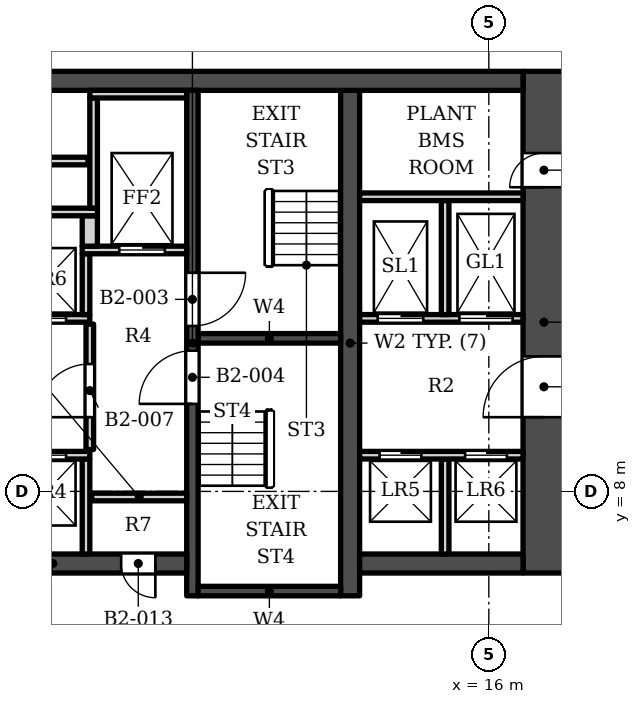
"""IFC4 building model, lengths in metres.
Left out: names, types, materials, properties, quantities, classifications, styles, units other than length and angle.
Written with IfcOpenShell. Run it as: python <this file> out.ifc"""

import sys

from ifc_helpers import new_model, si_unit, direction, frame, frame_2d, origin, place, context, subcontext, project, spatial, rectangle, extrude, element, fill, save


model = new_model("IFC4")
c1 = context("Model", 3, precision=1e-05, world=origin(), true_north=direction((0.0, 1.0)))
c2 = subcontext(c1, "Body", "Model", "MODEL_VIEW")
j1 = project(units=[si_unit("LENGTHUNIT", "METRE"), si_unit("PLANEANGLEUNIT", "RADIAN")], contexts=[c1])
p1 = place(None, origin())
s1 = spatial("IfcSite", under=j1, at=p1, CompositionType="ELEMENT")
p2 = place(p1, origin())
s2 = spatial("IfcBuilding", under=s1, at=p2, CompositionType="ELEMENT")
p3 = place(p2, frame((0.0, 0.0, -10.0)))
s3 = spatial("IfcBuildingStorey", under=s2, at=p3, CompositionType="ELEMENT", Elevation=-10.0)
p4 = place(p3, frame((-16.9, 18.802, -1.6), z_axis=(0.0, 0.0, 1.0), x_axis=(1.0, 0.0, 0.0)))
e1 = element("IfcWall", 1, at=p4, inside=s3, PredefinedType="SHEAR", context=c2, shape_type="SweptSolid", body=[
    extrude(rectangle(XDim=33.8, YDim=0.5, at=frame_2d((16.9, 0.0))), origin(), (0.0, 0.0, 1.0), 6.6),
])
p5 = place(p3, frame((12.35, 5.253, -1.6), z_axis=(0.0, 0.0, 1.0), x_axis=(0.0, 1.0, 0.0)))
e2 = element("IfcWall", 2, at=p5, inside=s3, PredefinedType="SHEAR", context=c2, shape_type="SweptSolid", body=[
    extrude(rectangle(XDim=13.3, YDim=0.5, at=frame_2d((6.65, 0.0))), origin(), (0.0, 0.0, 1.0), 6.6),
])
p6 = place(p3, frame((8.2, 5.253, -1.6), z_axis=(0.0, 0.0, 1.0), x_axis=(0.0, 1.0, 0.0)))
e3 = element("IfcWall", 3, at=p6, inside=s3, PredefinedType="SHEAR", context=c2, shape_type="SweptSolid", body=[
    extrude(rectangle(XDim=13.3, YDim=0.3, at=frame_2d((6.65, 0.0))), origin(), (0.0, 0.0, 1.0), 6.6),
])
p7 = place(p6, frame((7.1, 0.0, 1.6)))
e4 = element("IfcOpeningElement", 4, at=p7, cuts=e3, PredefinedType="OPENING", context=c2, shape_type="SweptSolid", body=[
    extrude(rectangle(XDim=1.4, YDim=2.1, at=frame_2d((0.7, 1.05))), frame((0.0, 0.16, 0.0), z_axis=(0.0, -1.0, 0.0), x_axis=(1.0, 0.0, 0.0)), (0.0, 0.0, 1.0), 0.32),
])
p8 = place(p6, frame((5.05, 0.0, 1.6)))
e5 = element("IfcOpeningElement", 5, at=p8, cuts=e3, PredefinedType="OPENING", context=c2, shape_type="SweptSolid", body=[
    extrude(rectangle(XDim=1.4, YDim=2.1, at=frame_2d((0.7, 1.05))), frame((0.0, 0.16, 0.0), z_axis=(0.0, -1.0, 0.0), x_axis=(1.0, 0.0, 0.0)), (0.0, 0.0, 1.0), 0.32),
])
for number, where, z_axis, x_axis in (
    (6, (8.35, 12.028, -1.6), (0.0, 0.0, 1.0), (1.0, 0.0, 0.0)),
    (7, (8.35, 5.378, -1.6), (0.0, 0.0, 1.0), (1.0, 0.0, 0.0)),
):
    element("IfcWall", number, at=place(p3, frame(where, z_axis=z_axis, x_axis=x_axis)), inside=s3, PredefinedType="SHEAR", context=c2, shape_type="SweptSolid", body=[
        extrude(rectangle(XDim=3.75, YDim=0.25, at=frame_2d((1.875, 0.0))), origin(), (0.0, 0.0, 1.0), 6.6),
    ])
p9 = place(p3, frame((1.0, 6.103, -1.6), z_axis=(0.0, 0.0, 1.0), x_axis=(1.0, 0.0, 0.0)))
e8 = element("IfcWall", 8, at=p9, inside=s3, PredefinedType="SHEAR", context=c2, shape_type="SweptSolid", body=[
    extrude(rectangle(XDim=7.05, YDim=0.5, at=frame_2d((3.525, 0.0))), origin(), (0.0, 0.0, 1.0), 6.6),
])
p10 = place(p9, frame((5.325, 0.0, 1.6)))
e9 = element("IfcOpeningElement", 9, at=p10, cuts=e8, PredefinedType="OPENING", context=c2, shape_type="SweptSolid", body=[
    extrude(rectangle(XDim=0.9, YDim=2.1, at=frame_2d((0.45, 1.05))), frame((0.0, 0.26, 0.0), z_axis=(0.0, -1.0, 0.0), x_axis=(1.0, 0.0, 0.0)), (0.0, 0.0, 1.0), 0.52),
])
p11 = place(p3, frame((12.6, 6.103, -1.6), z_axis=(0.0, 0.0, 1.0), x_axis=(1.0, 0.0, 0.0)))
e10 = element("IfcWall", 10, at=p11, inside=s3, PredefinedType="SHEAR", context=c2, shape_type="SweptSolid", body=[
    extrude(rectangle(XDim=4.3, YDim=0.5, at=frame_2d((2.15, 0.0))), origin(), (0.0, 0.0, 1.0), 6.6),
])
p12 = place(p3, frame((17.45, 5.853, -1.6), z_axis=(0.0, 0.0, 1.0), x_axis=(0.0, 1.0, 0.0)))
e11 = element("IfcWall", 11, at=p12, inside=s3, PredefinedType="SHEAR", context=c2, shape_type="SweptSolid", body=[
    extrude(rectangle(XDim=13.2, YDim=1.1, at=frame_2d((6.6, 0.0))), origin(), (0.0, 0.0, 1.0), 6.6),
])
p13 = place(p12, frame((4.1, 0.0, 1.6)))
e12 = element("IfcOpeningElement", 12, at=p13, cuts=e11, PredefinedType="OPENING", context=c2, shape_type="SweptSolid", body=[
    extrude(rectangle(XDim=1.6, YDim=2.1, at=frame_2d((0.8, 1.05))), frame((0.0, 0.56, 0.0), z_axis=(0.0, -1.0, 0.0), x_axis=(1.0, 0.0, 0.0)), (0.0, 0.0, 1.0), 1.12),
])
p14 = place(p12, frame((10.15, 0.0, 1.6)))
e13 = element("IfcOpeningElement", 13, at=p14, cuts=e11, PredefinedType="OPENING", context=c2, shape_type="SweptSolid", body=[
    extrude(rectangle(XDim=0.9, YDim=2.1, at=frame_2d((0.45, 1.05))), frame((0.0, 0.56, 0.0), z_axis=(0.0, -1.0, 0.0), x_axis=(1.0, 0.0, 0.0)), (0.0, 0.0, 1.0), 1.12),
])
for number, where, z_axis, x_axis in (
    (14, (5.4, 6.353, 0.0), (0.0, 0.0, 1.0), (0.0, 1.0, 0.0)),
    (15, (14.85, 6.353, 0.0), (0.0, 0.0, 1.0), (0.0, 1.0, 0.0)),
    (16, (5.55, 7.853, 0.0), (0.0, 0.0, 1.0), (1.0, 0.0, 0.0)),
):
    element("IfcWall", number, at=place(p3, frame(where, z_axis=z_axis, x_axis=x_axis)), inside=s3, PredefinedType="SOLIDWALL", context=c2, shape_type="SweptSolid", body=[
        extrude(rectangle(XDim=2.5, YDim=0.2, at=frame_2d((1.25, 0.0))), origin(), (0.0, 0.0, 1.0), 4.5),
    ])
p15 = place(p3, frame((1.0, 8.953, 0.0), z_axis=(0.0, 0.0, 1.0), x_axis=(1.0, 0.0, 0.0)))
e17 = element("IfcWall", 17, at=p15, inside=s3, PredefinedType="SOLIDWALL", context=c2, shape_type="SweptSolid", body=[
    extrude(rectangle(XDim=4.5, YDim=0.2, at=frame_2d((2.25, 0.0))), origin(), (0.0, 0.0, 1.0), 4.5),
])
p16 = place(p15, frame((0.625, 0.0, 0.0)))
e18 = element("IfcOpeningElement", 18, at=p16, cuts=e17, PredefinedType="OPENING", context=c2, shape_type="SweptSolid", body=[
    extrude(rectangle(XDim=1.1, YDim=2.1, at=frame_2d((0.55, 1.05))), frame((0.0, 0.11, 0.0), z_axis=(0.0, -1.0, 0.0), x_axis=(1.0, 0.0, 0.0)), (0.0, 0.0, 1.0), 0.22),
])
p17 = place(p15, frame((2.775, 0.0, 0.0)))
e19 = element("IfcOpeningElement", 19, at=p17, cuts=e17, PredefinedType="OPENING", context=c2, shape_type="SweptSolid", body=[
    extrude(rectangle(XDim=1.1, YDim=2.1, at=frame_2d((0.55, 1.05))), frame((0.0, 0.11, 0.0), z_axis=(0.0, -1.0, 0.0), x_axis=(1.0, 0.0, 0.0)), (0.0, 0.0, 1.0), 0.22),
])
p18 = place(p3, frame((12.6, 8.953, 0.0), z_axis=(0.0, 0.0, 1.0), x_axis=(1.0, 0.0, 0.0)))
e20 = element("IfcWall", 20, at=p18, inside=s3, PredefinedType="SOLIDWALL", context=c2, shape_type="SweptSolid", body=[
    extrude(rectangle(XDim=4.3, YDim=0.2, at=frame_2d((2.15, 0.0))), origin(), (0.0, 0.0, 1.0), 4.5),
])
p19 = place(p18, frame((0.525, 0.0, 0.0)))
e21 = element("IfcOpeningElement", 21, at=p19, cuts=e20, PredefinedType="OPENING", context=c2, shape_type="SweptSolid", body=[
    extrude(rectangle(XDim=1.1, YDim=2.1, at=frame_2d((0.55, 1.05))), frame((0.0, 0.11, 0.0), z_axis=(0.0, -1.0, 0.0), x_axis=(1.0, 0.0, 0.0)), (0.0, 0.0, 1.0), 0.22),
])
p20 = place(p18, frame((2.775, 0.0, 0.0)))
e22 = element("IfcOpeningElement", 22, at=p20, cuts=e20, PredefinedType="OPENING", context=c2, shape_type="SweptSolid", body=[
    extrude(rectangle(XDim=1.1, YDim=2.1, at=frame_2d((0.55, 1.05))), frame((0.0, 0.11, 0.0), z_axis=(0.0, -1.0, 0.0), x_axis=(1.0, 0.0, 0.0)), (0.0, 0.0, 1.0), 0.22),
])
p21 = place(p3, frame((5.5, 9.103, 0.0), z_axis=(0.0, 0.0, 1.0), x_axis=(0.0, 1.0, 0.0)))
e23 = element("IfcWall", 23, at=p21, inside=s3, PredefinedType="SOLIDWALL", context=c2, shape_type="SweptSolid", body=[
    extrude(rectangle(XDim=3.3, YDim=0.2, at=frame_2d((1.65, 0.0))), origin(), (0.0, 0.0, 1.0), 4.5),
])
p22 = place(p21, frame((0.85, 0.0, 0.0)))
e24 = element("IfcOpeningElement", 24, at=p22, cuts=e23, PredefinedType="OPENING", context=c2, shape_type="SweptSolid", body=[
    extrude(rectangle(XDim=1.4, YDim=2.1, at=frame_2d((0.7, 1.05))), frame((0.0, 0.11, 0.0), z_axis=(0.0, -1.0, 0.0), x_axis=(1.0, 0.0, 0.0)), (0.0, 0.0, 1.0), 0.22),
])
p23 = place(p3, frame((-1.5, 12.552, 0.0), z_axis=(0.0, 0.0, 1.0), x_axis=(1.0, 0.0, 0.0)))
e25 = element("IfcWall", 25, at=p23, inside=s3, PredefinedType="SOLIDWALL", context=c2, shape_type="SweptSolid", body=[
    extrude(rectangle(XDim=7.0, YDim=0.2, at=frame_2d((3.5, 0.0))), origin(), (0.0, 0.0, 1.0), 4.5),
])
p24 = place(p23, frame((0.6, 0.0, 0.0)))
e26 = element("IfcOpeningElement", 26, at=p24, cuts=e25, PredefinedType="OPENING", context=c2, shape_type="SweptSolid", body=[
    extrude(rectangle(XDim=1.4, YDim=2.4, at=frame_2d((0.7, 1.2))), frame((0.0, 0.11, 0.0), z_axis=(0.0, -1.0, 0.0), x_axis=(1.0, 0.0, 0.0)), (0.0, 0.0, 1.0), 0.22),
])
p25 = place(p23, frame((3.075, 0.0, 0.0)))
e27 = element("IfcOpeningElement", 27, at=p25, cuts=e25, PredefinedType="OPENING", context=c2, shape_type="SweptSolid", body=[
    extrude(rectangle(XDim=1.1, YDim=2.1, at=frame_2d((0.55, 1.05))), frame((0.0, 0.11, 0.0), z_axis=(0.0, -1.0, 0.0), x_axis=(1.0, 0.0, 0.0)), (0.0, 0.0, 1.0), 0.22),
])
p26 = place(p23, frame((5.275, 0.0, 0.0)))
e28 = element("IfcOpeningElement", 28, at=p26, cuts=e25, PredefinedType="OPENING", context=c2, shape_type="SweptSolid", body=[
    extrude(rectangle(XDim=1.1, YDim=2.1, at=frame_2d((0.55, 1.05))), frame((0.0, 0.11, 0.0), z_axis=(0.0, -1.0, 0.0), x_axis=(1.0, 0.0, 0.0)), (0.0, 0.0, 1.0), 0.22),
])
p27 = place(p3, frame((12.6, 12.552, 0.0), z_axis=(0.0, 0.0, 1.0), x_axis=(1.0, 0.0, 0.0)))
e29 = element("IfcWall", 29, at=p27, inside=s3, PredefinedType="SOLIDWALL", context=c2, shape_type="SweptSolid", body=[
    extrude(rectangle(XDim=4.3, YDim=0.2, at=frame_2d((2.15, 0.0))), origin(), (0.0, 0.0, 1.0), 4.5),
])
p28 = place(p27, frame((0.475, 0.0, 0.0)))
e30 = element("IfcOpeningElement", 30, at=p28, cuts=e29, PredefinedType="OPENING", context=c2, shape_type="SweptSolid", body=[
    extrude(rectangle(XDim=1.2, YDim=2.1, at=frame_2d((0.6, 1.05))), frame((0.0, 0.11, 0.0), z_axis=(0.0, -1.0, 0.0), x_axis=(1.0, 0.0, 0.0)), (0.0, 0.0, 1.0), 0.22),
])
p29 = place(p27, frame((2.625, 0.0, 0.0)))
e31 = element("IfcOpeningElement", 31, at=p29, cuts=e29, PredefinedType="OPENING", context=c2, shape_type="SweptSolid", body=[
    extrude(rectangle(XDim=1.4, YDim=2.1, at=frame_2d((0.7, 1.05))), frame((0.0, 0.11, 0.0), z_axis=(0.0, -1.0, 0.0), x_axis=(1.0, 0.0, 0.0)), (0.0, 0.0, 1.0), 0.22),
])
p30 = place(p3, frame((5.4, 12.653, 0.0), z_axis=(0.0, 0.0, 1.0), x_axis=(0.0, 1.0, 0.0)))
e32 = element("IfcWall", 32, at=p30, inside=s3, PredefinedType="SOLIDWALL", context=c2, shape_type="SweptSolid", body=[
    extrude(rectangle(XDim=1.6, YDim=0.2, at=frame_2d((0.8, 0.0))), origin(), (0.0, 0.0, 1.0), 4.5),
])
p31 = place(p3, frame((14.85, 12.653, 0.0), z_axis=(0.0, 0.0, 1.0), x_axis=(0.0, 1.0, 0.0)))
e33 = element("IfcWall", 33, at=p31, inside=s3, PredefinedType="SOLIDWALL", context=c2, shape_type="SweptSolid", body=[
    extrude(rectangle(XDim=3.0, YDim=0.2, at=frame_2d((1.5, 0.0))), origin(), (0.0, 0.0, 1.0), 4.5),
])
p32 = place(p3, frame((5.3, 14.353, 0.0), z_axis=(0.0, 0.0, 1.0), x_axis=(1.0, 0.0, 0.0)))
e34 = element("IfcWall", 34, at=p32, inside=s3, PredefinedType="SOLIDWALL", context=c2, shape_type="SweptSolid", body=[
    extrude(rectangle(XDim=2.75, YDim=0.2, at=frame_2d((1.375, 0.0))), origin(), (0.0, 0.0, 1.0), 4.5),
])
p33 = place(p32, frame((0.975, 0.0, 0.0)))
e35 = element("IfcOpeningElement", 35, at=p33, cuts=e34, PredefinedType="OPENING", context=c2, shape_type="SweptSolid", body=[
    extrude(rectangle(XDim=1.2, YDim=2.1, at=frame_2d((0.6, 1.05))), frame((0.0, 0.11, 0.0), z_axis=(0.0, -1.0, 0.0), x_axis=(1.0, 0.0, 0.0)), (0.0, 0.0, 1.0), 0.22),
])
p34 = place(p3, frame((5.5, 14.453, 0.0), z_axis=(0.0, 0.0, 1.0), x_axis=(0.0, 1.0, 0.0)))
e36 = element("IfcWall", 36, at=p34, inside=s3, PredefinedType="SOLIDWALL", context=c2, shape_type="SweptSolid", body=[
    extrude(rectangle(XDim=0.8, YDim=0.4, at=frame_2d((0.4, 0.0))), origin(), (0.0, 0.0, 1.0), 4.5),
])
p35 = place(p3, frame((-1.5, 15.353, 0.0), z_axis=(0.0, 0.0, 1.0), x_axis=(1.0, 0.0, 0.0)))
e37 = element("IfcWall", 37, at=p35, inside=s3, PredefinedType="SOLIDWALL", context=c2, shape_type="SweptSolid", body=[
    extrude(rectangle(XDim=7.2, YDim=0.2, at=frame_2d((3.6, 0.0))), origin(), (0.0, 0.0, 1.0), 4.5),
])
p36 = place(p3, frame((5.6, 15.453, 0.0), z_axis=(0.0, 0.0, 1.0), x_axis=(0.0, 1.0, 0.0)))
e38 = element("IfcWall", 38, at=p36, inside=s3, PredefinedType="SOLIDWALL", context=c2, shape_type="SweptSolid", body=[
    extrude(rectangle(XDim=2.9, YDim=0.2, at=frame_2d((1.45, 0.0))), origin(), (0.0, 0.0, 1.0), 4.5),
])
p37 = place(p3, frame((12.6, 15.753, 0.0), z_axis=(0.0, 0.0, 1.0), x_axis=(1.0, 0.0, 0.0)))
e39 = element("IfcWall", 39, at=p37, inside=s3, PredefinedType="SOLIDWALL", context=c2, shape_type="SweptSolid", body=[
    extrude(rectangle(XDim=4.3, YDim=0.2, at=frame_2d((2.15, 0.0))), origin(), (0.0, 0.0, 1.0), 4.5),
])
p38 = place(p3, frame((-1.4, 16.693, 0.0), z_axis=(0.0, 0.0, 1.0), x_axis=(1.0, 0.0, 0.0)))
e40 = element("IfcWall", 40, at=p38, inside=s3, PredefinedType="SOLIDWALL", context=c2, shape_type="SweptSolid", body=[
    extrude(rectangle(XDim=6.85, YDim=0.2, at=frame_2d((3.425, 0.0))), origin(), (0.0, 0.0, 1.0), 4.5),
])
p39 = place(p3, frame((5.5, 18.453, 0.0), z_axis=(0.0, 0.0, 1.0), x_axis=(1.0, 0.0, 0.0)))
e41 = element("IfcWall", 41, at=p39, inside=s3, PredefinedType="SOLIDWALL", context=c2, shape_type="SweptSolid", body=[
    extrude(rectangle(XDim=2.55, YDim=0.2, at=frame_2d((1.275, 0.0))), origin(), (0.0, 0.0, 1.0), 4.5),
])
p40 = place(p17, origin())
e42 = element("IfcDoor", 42, at=p40, inside=s3, OperationType="DOUBLE_DOOR_SLIDING", PredefinedType="DOOR", context=c2, shape_type="SweptSolid", body=[
    extrude(rectangle(XDim=1.1, YDim=2.1, at=frame_2d((0.55, 1.05))), frame((0.0, 0.025, 0.0), z_axis=(0.0, -1.0, 0.0), x_axis=(1.0, 0.0, 0.0)), (0.0, 0.0, 1.0), 0.05),
])
fill(e19, e42)
p41 = place(p26, origin())
e43 = element("IfcDoor", 43, at=p41, inside=s3, OperationType="DOUBLE_DOOR_SLIDING", PredefinedType="DOOR", context=c2, shape_type="SweptSolid", body=[
    extrude(rectangle(XDim=1.1, YDim=2.1, at=frame_2d((0.55, 1.05))), frame((0.0, 0.025, 0.0), z_axis=(0.0, -1.0, 0.0), x_axis=(1.0, 0.0, 0.0)), (0.0, 0.0, 1.0), 0.05),
])
fill(e28, e43)
p42 = place(p33, origin())
e44 = element("IfcDoor", 44, at=p42, inside=s3, OperationType="DOUBLE_DOOR_SLIDING", PredefinedType="DOOR", context=c2, shape_type="SweptSolid", body=[
    extrude(rectangle(XDim=1.2, YDim=2.1, at=frame_2d((0.6, 1.05))), frame((0.0, 0.025, 0.0), z_axis=(0.0, -1.0, 0.0), x_axis=(1.0, 0.0, 0.0)), (0.0, 0.0, 1.0), 0.05),
])
fill(e35, e44)
p43 = place(p19, origin())
e45 = element("IfcDoor", 45, at=p43, inside=s3, OperationType="DOUBLE_DOOR_SLIDING", PredefinedType="DOOR", context=c2, shape_type="SweptSolid", body=[
    extrude(rectangle(XDim=1.1, YDim=2.1, at=frame_2d((0.55, 1.05))), frame((0.0, 0.025, 0.0), z_axis=(0.0, -1.0, 0.0), x_axis=(1.0, 0.0, 0.0)), (0.0, 0.0, 1.0), 0.05),
])
fill(e21, e45)
p44 = place(p20, origin())
e46 = element("IfcDoor", 46, at=p44, inside=s3, OperationType="DOUBLE_DOOR_SLIDING", PredefinedType="DOOR", context=c2, shape_type="SweptSolid", body=[
    extrude(rectangle(XDim=1.1, YDim=2.1, at=frame_2d((0.55, 1.05))), frame((0.0, 0.025, 0.0), z_axis=(0.0, -1.0, 0.0), x_axis=(1.0, 0.0, 0.0)), (0.0, 0.0, 1.0), 0.05),
])
fill(e22, e46)
p45 = place(p28, origin())
e47 = element("IfcDoor", 47, at=p45, inside=s3, OperationType="DOUBLE_DOOR_SLIDING", PredefinedType="DOOR", context=c2, shape_type="SweptSolid", body=[
    extrude(rectangle(XDim=1.2, YDim=2.1, at=frame_2d((0.6, 1.05))), frame((0.0, 0.025, 0.0), z_axis=(0.0, -1.0, 0.0), x_axis=(1.0, 0.0, 0.0)), (0.0, 0.0, 1.0), 0.05),
])
fill(e30, e47)
p46 = place(p29, origin())
e48 = element("IfcDoor", 48, at=p46, inside=s3, OperationType="DOUBLE_DOOR_SLIDING", PredefinedType="DOOR", context=c2, shape_type="SweptSolid", body=[
    extrude(rectangle(XDim=1.4, YDim=2.1, at=frame_2d((0.7, 1.05))), frame((0.0, 0.025, 0.0), z_axis=(0.0, -1.0, 0.0), x_axis=(1.0, 0.0, 0.0)), (0.0, 0.0, 1.0), 0.05),
])
fill(e31, e48)
p47 = place(p7, origin())
e49 = element("IfcDoor", 49, at=p47, inside=s3, OperationType="SINGLE_SWING_RIGHT", PredefinedType="DOOR", context=c2, shape_type="SweptSolid", body=[
    extrude(rectangle(XDim=1.4, YDim=2.1, at=frame_2d((0.7, 1.05))), frame((0.0, 0.025, 0.0), z_axis=(0.0, -1.0, 0.0), x_axis=(1.0, 0.0, 0.0)), (0.0, 0.0, 1.0), 0.05),
])
fill(e4, e49)
p48 = place(p8, origin())
e50 = element("IfcDoor", 50, at=p48, inside=s3, OperationType="SINGLE_SWING_LEFT", PredefinedType="DOOR", context=c2, shape_type="SweptSolid", body=[
    extrude(rectangle(XDim=1.4, YDim=2.1, at=frame_2d((0.7, 1.05))), frame((0.0, 0.025, 0.0), z_axis=(0.0, -1.0, 0.0), x_axis=(1.0, 0.0, 0.0)), (0.0, 0.0, 1.0), 0.05),
])
fill(e5, e50)
p49 = place(p22, origin())
e51 = element("IfcDoor", 51, at=p49, inside=s3, OperationType="SINGLE_SWING_LEFT", PredefinedType="DOOR", context=c2, shape_type="SweptSolid", body=[
    extrude(rectangle(XDim=1.4, YDim=2.1, at=frame_2d((0.7, 1.05))), frame((0.0, 0.025, 0.0), z_axis=(0.0, -1.0, 0.0), x_axis=(1.0, 0.0, 0.0)), (0.0, 0.0, 1.0), 0.05),
])
fill(e24, e51)
p50 = place(p10, origin())
e52 = element("IfcDoor", 52, at=p50, inside=s3, OperationType="SINGLE_SWING_RIGHT", PredefinedType="DOOR", context=c2, shape_type="SweptSolid", body=[
    extrude(rectangle(XDim=0.9, YDim=2.1, at=frame_2d((0.45, 1.05))), frame((0.0, 0.025, 0.0), z_axis=(0.0, -1.0, 0.0), x_axis=(1.0, 0.0, 0.0)), (0.0, 0.0, 1.0), 0.05),
])
fill(e9, e52)
p51 = place(p13, origin())
e53 = element("IfcDoor", 53, at=p51, inside=s3, OperationType="DOUBLE_DOOR_SINGLE_SWING", PredefinedType="DOOR", context=c2, shape_type="SweptSolid", body=[
    extrude(rectangle(XDim=1.6, YDim=2.1, at=frame_2d((0.8, 1.05))), frame((0.0, 0.275, 0.0), z_axis=(0.0, -1.0, 0.0), x_axis=(1.0, 0.0, 0.0)), (0.0, 0.0, 1.0), 0.05),
])
fill(e12, e53)
p52 = place(p14, origin())
e54 = element("IfcDoor", 54, at=p52, inside=s3, OperationType="SINGLE_SWING_LEFT", PredefinedType="DOOR", context=c2, shape_type="SweptSolid", body=[
    extrude(rectangle(XDim=0.9, YDim=2.1, at=frame_2d((0.45, 1.05))), frame((0.0, 0.275, 0.0), z_axis=(0.0, -1.0, 0.0), x_axis=(1.0, 0.0, 0.0)), (0.0, 0.0, 1.0), 0.05),
])
fill(e13, e54)
save(model, sys.argv[1])
